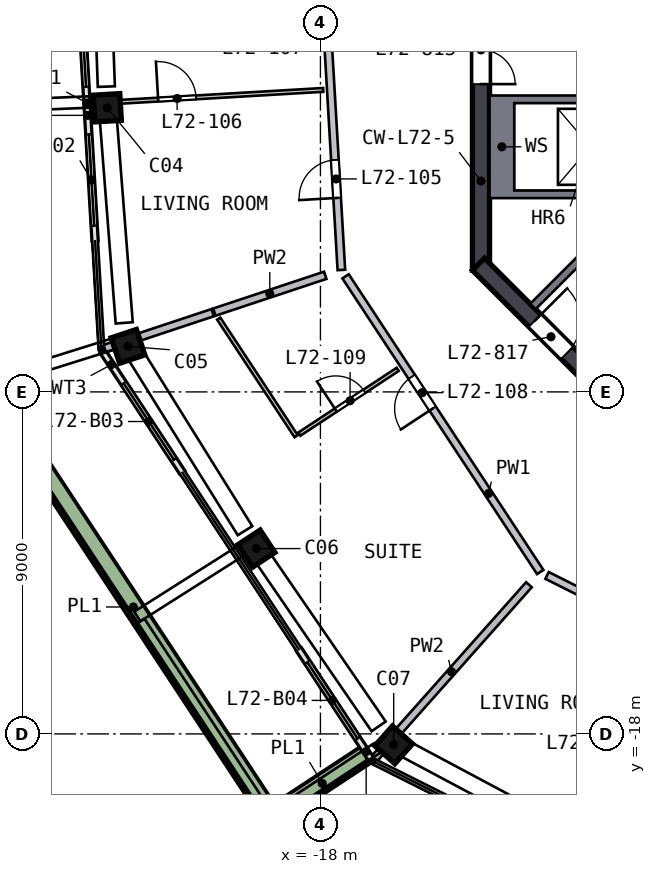
"""IFC4 building model, lengths in metres.
Left out: names, types, materials, properties, quantities, classifications, styles, units other than length and angle.
Written with IfcOpenShell. Run it as: python <this file> out.ifc"""

import sys

from ifc_helpers import new_model, si_unit, direction, frame, frame_2d, origin, origin_2d, place, context, subcontext, project, spatial, polyline, rectangle, outline, extrude, element, fill, save


model = new_model("IFC4")
c1 = context("Model", 3, precision=1e-05, world=origin(), true_north=direction((0.0, 1.0)))
c2 = subcontext(c1, "Body", "Model", "MODEL_VIEW")
j1 = project(units=[si_unit("LENGTHUNIT", "METRE"), si_unit("PLANEANGLEUNIT", "RADIAN")], contexts=[c1])
p1 = place(None, origin())
s1 = spatial("IfcSite", under=j1, at=p1, CompositionType="ELEMENT")
p2 = place(p1, origin())
s2 = spatial("IfcBuilding", under=s1, at=p2, CompositionType="ELEMENT")
p3 = place(p2, frame((0.0, 0.0, 291.5)))
s3 = spatial("IfcBuildingStorey", under=s2, at=p3, CompositionType="ELEMENT", Elevation=291.5)
p4 = place(p3, frame((-23.618, -1.387, 0.0), z_axis=(0.007528817, -0.112247814, 0.993651722), x_axis=(0.058082911, -0.991953134, -0.112496023)))
e1 = element("IfcColumn", 1, at=p4, inside=s3, PredefinedType="COLUMN", context=c2, shape_type="SweptSolid", body=[
    extrude(rectangle(XDim=0.7, YDim=0.7, at=origin_2d()), origin(), (0.0, 0.0, 1.0), 3.21),
])
p5 = place(p3, frame((-23.109, -7.669, 0.0), z_axis=(0.037401551, -0.109619993, 0.993269642), x_axis=(-0.312748183, 0.942748169, 0.11582083)))
e2 = element("IfcColumn", 2, at=p5, inside=s3, PredefinedType="COLUMN", context=c2, shape_type="SweptSolid", body=[
    extrude(rectangle(XDim=0.7, YDim=0.7, at=origin_2d()), origin(), (0.0, 0.0, 1.0), 3.212),
])
p6 = place(p3, frame((-19.76, -13.01, 0.0), z_axis=(0.062663903, -0.093463516, 0.993648734), x_axis=(0.546321949, -0.829982551, -0.112522412)))
e3 = element("IfcColumn", 3, at=p6, inside=s3, PredefinedType="COLUMN", context=c2, shape_type="SweptSolid", body=[
    extrude(rectangle(XDim=0.7, YDim=0.7, at=origin_2d()), origin(), (0.0, 0.0, 1.0), 3.21),
])
p7 = place(p3, frame((-16.178, -18.196, 0.0), z_axis=(0.087194218, -0.076247429, 0.993269096), x_axis=(-0.742135032, 0.660166681, 0.115825506)))
e4 = element("IfcColumn", 4, at=p7, inside=s3, PredefinedType="COLUMN", context=c2, shape_type="SweptSolid", body=[
    extrude(rectangle(XDim=0.7, YDim=0.7, at=origin_2d()), origin(), (0.0, 0.0, 1.0), 3.212),
])
p8 = place(p3, frame((-13.775, 5.799, 0.0), z_axis=(0.0, 0.0, 1.0), x_axis=(0.0, -1.0, 0.0)))
e5 = element("IfcWall", 5, at=p8, inside=s3, PredefinedType="SHEAR", context=c2, shape_type="SweptSolid", body=[
    extrude(rectangle(XDim=11.598, YDim=0.45, at=frame_2d((5.799, 0.0))), origin(), (0.0, 0.0, 1.0), 3.5),
])
p9 = place(p8, frame((4.899, 0.0, 0.0)))
e6 = element("IfcOpeningElement", 6, at=p9, cuts=e5, PredefinedType="OPENING", context=c2, shape_type="SweptSolid", body=[
    extrude(rectangle(XDim=1.8, YDim=2.1, at=frame_2d((0.9, 1.05))), frame((0.0, 0.235, 0.0), z_axis=(0.0, -1.0, 0.0), x_axis=(1.0, 0.0, 0.0)), (0.0, 0.0, 1.0), 0.47),
])
p10 = place(p3, frame((-13.841, -5.64, 0.0), z_axis=(0.0, 0.0, 1.0), x_axis=(0.707106781, -0.707106781, 0.0)))
e7 = element("IfcWall", 7, at=p10, inside=s3, PredefinedType="SHEAR", context=c2, shape_type="SweptSolid", body=[
    extrude(rectangle(XDim=11.598, YDim=0.45, at=frame_2d((5.799, 0.0))), origin(), (0.0, 0.0, 1.0), 3.5),
])
p11 = place(p10, frame((2.099, 0.0, 0.0)))
e8 = element("IfcOpeningElement", 8, at=p11, cuts=e7, PredefinedType="OPENING", context=c2, shape_type="SweptSolid", body=[
    extrude(rectangle(XDim=1.2, YDim=2.1, at=frame_2d((0.6, 1.05))), frame((0.0, 0.235, 0.0), z_axis=(0.0, -1.0, 0.0), x_axis=(1.0, 0.0, 0.0)), (0.0, 0.0, 1.0), 0.47),
])
p12 = place(p3, frame((-24.332, 1.827, 0.0), z_axis=(0.0, 0.0, 1.0), x_axis=(0.058589922, -0.998282135, 0.0)))
e9 = element("IfcWall", 9, at=p12, inside=s3, PredefinedType="SOLIDWALL", context=c2, shape_type="SweptSolid", body=[
    extrude(rectangle(XDim=3.25, YDim=0.15, at=frame_2d((1.625, 0.0))), origin(), (0.0, 0.0, 1.0), 2.525),
])
p13 = place(p12, frame((0.4, 0.0, 0.0)))
e10 = element("IfcOpeningElement", 10, at=p13, cuts=e9, PredefinedType="OPENING", context=c2, shape_type="SweptSolid", body=[
    extrude(rectangle(XDim=2.4, YDim=2.4, at=frame_2d((1.2, 1.2))), frame((0.0, 0.085, 0.0), z_axis=(0.0, -1.0, 0.0), x_axis=(1.0, 0.0, 0.0)), (0.0, 0.0, 1.0), 0.17),
])
p14 = place(p3, frame((-24.142, -1.417, 0.0), z_axis=(0.0, 0.0, 1.0), x_axis=(0.058615017, -0.998280662, 0.0)))
e11 = element("IfcWall", 11, at=p14, inside=s3, PredefinedType="SOLIDWALL", context=c2, shape_type="SweptSolid", body=[
    extrude(rectangle(XDim=3.611, YDim=0.15, at=frame_2d((1.806, 0.0))), origin(), (0.0, 0.0, 1.0), 2.525),
])
p15 = place(p14, frame((0.811, 0.0, 0.0)))
e12 = element("IfcOpeningElement", 12, at=p15, cuts=e11, PredefinedType="OPENING", context=c2, shape_type="SweptSolid", body=[
    extrude(rectangle(XDim=2.4, YDim=2.4, at=frame_2d((1.2, 1.2))), frame((0.0, 0.085, 0.0), z_axis=(0.0, -1.0, 0.0), x_axis=(1.0, 0.0, 0.0)), (0.0, 0.0, 1.0), 0.17),
])
p16 = place(p3, frame((-23.718, -7.953, 0.0), z_axis=(0.0, 0.0, 1.0), x_axis=(0.549914882, -0.835220703, 0.0)))
e13 = element("IfcWall", 13, at=p16, inside=s3, PredefinedType="SOLIDWALL", context=c2, shape_type="SweptSolid", body=[
    extrude(rectangle(XDim=3.787, YDim=0.15, at=frame_2d((1.893, 0.0))), origin(), (0.0, 0.0, 1.0), 2.525),
])
p17 = place(p16, frame((0.987, 0.0, 0.0)))
e14 = element("IfcOpeningElement", 14, at=p17, cuts=e13, PredefinedType="OPENING", context=c2, shape_type="SweptSolid", body=[
    extrude(rectangle(XDim=2.4, YDim=2.4, at=frame_2d((1.2, 1.2))), frame((0.0, 0.085, 0.0), z_axis=(0.0, -1.0, 0.0), x_axis=(1.0, 0.0, 0.0)), (0.0, 0.0, 1.0), 0.17),
])
p18 = place(p3, frame((-18.564, -15.781, 0.0), z_axis=(0.0, 0.0, 1.0), x_axis=(0.54985724, -0.835258652, 0.0)))
e15 = element("IfcWall", 15, at=p18, inside=s3, PredefinedType="SOLIDWALL", context=c2, shape_type="SweptSolid", body=[
    extrude(rectangle(XDim=3.427, YDim=0.15, at=frame_2d((1.713, 0.0))), origin(), (0.0, 0.0, 1.0), 2.525),
])
p19 = place(p18, frame((0.4, 0.0, 0.0)))
e16 = element("IfcOpeningElement", 16, at=p19, cuts=e15, PredefinedType="OPENING", context=c2, shape_type="SweptSolid", body=[
    extrude(rectangle(XDim=2.4, YDim=2.4, at=frame_2d((1.2, 1.2))), frame((0.0, 0.085, 0.0), z_axis=(0.0, -1.0, 0.0), x_axis=(1.0, 0.0, 0.0)), (0.0, 0.0, 1.0), 0.17),
])
p20 = place(p3, frame((-26.698, -8.928, 0.0), z_axis=(0.0, 0.0, 1.0), x_axis=(0.549900075, -0.835230452, 0.0)))
e17 = element("IfcWall", 17, at=p20, inside=s3, PredefinedType="SOLIDWALL", context=c2, shape_type="SweptSolid", body=[
    extrude(rectangle(XDim=13.724, YDim=0.5, at=frame_2d((6.862, 0.0))), origin(), (0.0, 0.0, 1.0), 0.7),
])
p21 = place(p3, frame((-19.08, -20.044, 0.0), z_axis=(0.0, 0.0, 1.0), x_axis=(0.835250913, 0.549868995, 0.0)))
e18 = element("IfcWall", 18, at=p21, inside=s3, PredefinedType="SOLIDWALL", context=c2, shape_type="SweptSolid", body=[
    extrude(rectangle(XDim=2.699, YDim=0.5, at=frame_2d((1.35, 0.0))), origin(), (0.0, 0.0, 1.0), 0.7),
])
p22 = place(p3, origin())
e19 = element("IfcWall", 19, at=p22, inside=s3, PredefinedType="SOLIDWALL", context=c2, shape_type="SweptSolid", body=[
    extrude(outline(polyline([(-13.55, -3.9), (-13.55, -1.2), (-9.9, -1.2), (-9.9, -1.4), (-12.9, -1.4), (-12.9, -3.7), (-9.9, -3.7), (-9.9, -3.9), (-13.55, -3.9)])), origin(), (0.0, 0.0, 1.0), 3.19),
])
p23 = place(p3, frame((-9.334, -3.677, 0.0), z_axis=(0.0, 0.0, 1.0), x_axis=(-0.707106781, -0.707106781, 0.0)))
e20 = element("IfcWall", 20, at=p23, inside=s3, PredefinedType="SOLIDWALL", context=c2, shape_type="SweptSolid", body=[
    extrude(rectangle(XDim=4.35, YDim=0.2, at=frame_2d((2.175, 0.0))), origin(), (0.0, 0.0, 1.0), 3.19),
])
p24 = place(p3, frame((-17.449, -5.791, 0.0), z_axis=(0.0, 0.0, 1.0), x_axis=(-0.058619102, 0.998280422, 0.0)))
e21 = element("IfcWall", 21, at=p24, inside=s3, PredefinedType="SOLIDWALL", context=c2, shape_type="SweptSolid", body=[
    extrude(rectangle(XDim=9.317, YDim=0.2, at=frame_2d((4.658, 0.0))), origin(), (0.0, 0.0, 1.0), 3.19),
])
p25 = place(p24, frame((1.9, 0.0, 0.0)))
e22 = element("IfcOpeningElement", 22, at=p25, cuts=e21, PredefinedType="OPENING", context=c2, shape_type="SweptSolid", body=[
    extrude(rectangle(XDim=1.0, YDim=2.1, at=frame_2d((0.5, 1.05))), frame((0.0, 0.11, 0.0), z_axis=(0.0, -1.0, 0.0), x_axis=(1.0, 0.0, 0.0)), (0.0, 0.0, 1.0), 0.22),
])
p26 = place(p3, frame((-12.216, -13.74, 0.0), z_axis=(0.0, 0.0, 1.0), x_axis=(-0.549889366, 0.835237502, 0.0)))
e23 = element("IfcWall", 23, at=p26, inside=s3, PredefinedType="SOLIDWALL", context=c2, shape_type="SweptSolid", body=[
    extrude(rectangle(XDim=9.316, YDim=0.2, at=frame_2d((4.658, 0.0))), origin(), (0.0, 0.0, 1.0), 3.19),
])
p27 = place(p26, frame((5.15, 0.0, 0.0)))
e24 = element("IfcOpeningElement", 24, at=p27, cuts=e23, PredefinedType="OPENING", context=c2, shape_type="SweptSolid", body=[
    extrude(rectangle(XDim=1.0, YDim=2.1, at=frame_2d((0.5, 1.05))), frame((0.0, 0.11, 0.0), z_axis=(0.0, -1.0, 0.0), x_axis=(1.0, 0.0, 0.0)), (0.0, 0.0, 1.0), 0.22),
])
p28 = place(p3, frame((-3.888, -17.917, 0.0), z_axis=(0.0, 0.0, 1.0), x_axis=(-0.893848004, 0.448370098, 0.0)))
e25 = element("IfcWall", 25, at=p28, inside=s3, PredefinedType="SOLIDWALL", context=c2, shape_type="SweptSolid", body=[
    extrude(rectangle(XDim=9.117, YDim=0.2, at=frame_2d((4.558, 0.0))), origin(), (0.0, 0.0, 1.0), 3.19),
])
p29 = place(p28, frame((6.458, 0.0, 0.0)))
e26 = element("IfcOpeningElement", 26, at=p29, cuts=e25, PredefinedType="OPENING", context=c2, shape_type="SweptSolid", body=[
    extrude(rectangle(XDim=1.0, YDim=2.1, at=frame_2d((0.5, 1.05))), frame((0.0, 0.11, 0.0), z_axis=(0.0, -1.0, 0.0), x_axis=(1.0, 0.0, 0.0)), (0.0, 0.0, 1.0), 0.22),
])
p30 = place(p3, frame((-20.835, -6.915, 0.0), z_axis=(0.0, 0.0, 1.0), x_axis=(-0.949104027, -0.31496277, 0.0)))
e27 = element("IfcWall", 27, at=p30, inside=s3, PredefinedType="SOLIDWALL", context=c2, shape_type="SweptSolid", body=[
    extrude(rectangle(XDim=3.011, YDim=0.2, at=frame_2d((1.506, 0.0))), origin(), (0.0, 0.0, 1.0), 3.19),
])
p31 = place(p3, frame((-17.873, -5.932, 0.0), z_axis=(0.0, 0.0, 1.0), x_axis=(-0.949095381, -0.314988821, 0.0)))
e28 = element("IfcWall", 28, at=p31, inside=s3, PredefinedType="SOLIDWALL", context=c2, shape_type="SweptSolid", body=[
    extrude(rectangle(XDim=3.075, YDim=0.2, at=frame_2d((1.537, 0.0))), origin(), (0.0, 0.0, 1.0), 3.19),
])
p32 = place(p3, frame((-12.513, -14.074, 0.0), z_axis=(0.0, 0.0, 1.0), x_axis=(-0.664445384, -0.747336826, 0.0)))
e29 = element("IfcWall", 29, at=p32, inside=s3, PredefinedType="SOLIDWALL", context=c2, shape_type="SweptSolid", body=[
    extrude(rectangle(XDim=6.132, YDim=0.2, at=frame_2d((3.066, 0.0))), origin(), (0.0, 0.0, 1.0), 3.19),
])
p33 = place(p3, frame((-24.067, -1.413, 0.0), z_axis=(0.0, 0.0, 1.0), x_axis=(0.998279571, 0.058633592, 0.0)))
e30 = element("IfcWall", 30, at=p33, inside=s3, PredefinedType="PARTITIONING", context=c2, shape_type="SweptSolid", body=[
    extrude(rectangle(XDim=6.15, YDim=0.1, at=frame_2d((3.075, 0.0))), origin(), (0.0, 0.0, 1.0), 3.19),
])
p34 = place(p33, frame((1.8, 0.0, 0.0)))
e31 = element("IfcOpeningElement", 31, at=p34, cuts=e30, PredefinedType="OPENING", context=c2, shape_type="SweptSolid", body=[
    extrude(rectangle(XDim=1.0, YDim=2.1, at=frame_2d((0.5, 1.05))), frame((0.0, 0.06, 0.0), z_axis=(0.0, -1.0, 0.0), x_axis=(1.0, 0.0, 0.0)), (0.0, 0.0, 1.0), 0.12),
])
p35 = place(p3, frame((-18.639, -10.166, 0.0), z_axis=(0.0, 0.0, 1.0), x_axis=(-0.54989974, 0.835230673, 0.0)))
e32 = element("IfcWall", 32, at=p35, inside=s3, PredefinedType="PARTITIONING", context=c2, shape_type="SweptSolid", body=[
    extrude(rectangle(XDim=3.704, YDim=0.1, at=frame_2d((1.852, 0.0))), origin(), (0.0, 0.0, 1.0), 3.19),
])
p36 = place(p3, frame((-18.555, -10.111, 0.0), z_axis=(0.0, 0.0, 1.0), x_axis=(0.835199098, 0.549947695, 0.0)))
e33 = element("IfcWall", 33, at=p36, inside=s3, PredefinedType="PARTITIONING", context=c2, shape_type="SweptSolid", body=[
    extrude(rectangle(XDim=3.1, YDim=0.1, at=frame_2d((1.55, 0.0))), origin(), (0.0, 0.0, 1.0), 3.19),
])
p37 = place(p36, frame((1.15, 0.0, 0.0)))
e34 = element("IfcOpeningElement", 34, at=p37, cuts=e33, PredefinedType="OPENING", context=c2, shape_type="SweptSolid", body=[
    extrude(rectangle(XDim=0.9, YDim=2.1, at=frame_2d((0.45, 1.05))), frame((0.0, 0.06, 0.0), z_axis=(0.0, -1.0, 0.0), x_axis=(1.0, 0.0, 0.0)), (0.0, 0.0, 1.0), 0.12),
])
p38 = place(p13, origin())
e35 = element("IfcDoor", 35, at=p38, inside=s3, OperationType="SLIDING_TO_RIGHT", PredefinedType="DOOR", context=c2, shape_type="SweptSolid", body=[
    extrude(rectangle(XDim=2.4, YDim=2.4, at=frame_2d((1.2, 1.2))), frame((0.0, 0.025, 0.0), z_axis=(0.0, -1.0, 0.0), x_axis=(1.0, 0.0, 0.0)), (0.0, 0.0, 1.0), 0.05),
])
fill(e10, e35)
p39 = place(p15, origin())
e36 = element("IfcDoor", 36, at=p39, inside=s3, OperationType="SLIDING_TO_LEFT", PredefinedType="DOOR", context=c2, shape_type="SweptSolid", body=[
    extrude(rectangle(XDim=2.4, YDim=2.4, at=frame_2d((1.2, 1.2))), frame((0.0, 0.025, 0.0), z_axis=(0.0, -1.0, 0.0), x_axis=(1.0, 0.0, 0.0)), (0.0, 0.0, 1.0), 0.05),
])
fill(e12, e36)
p40 = place(p17, origin())
e37 = element("IfcDoor", 37, at=p40, inside=s3, OperationType="SLIDING_TO_LEFT", PredefinedType="DOOR", context=c2, shape_type="SweptSolid", body=[
    extrude(rectangle(XDim=2.4, YDim=2.4, at=frame_2d((1.2, 1.2))), frame((0.0, 0.025, 0.0), z_axis=(0.0, -1.0, 0.0), x_axis=(1.0, 0.0, 0.0)), (0.0, 0.0, 1.0), 0.05),
])
fill(e14, e37)
p41 = place(p19, origin())
e38 = element("IfcDoor", 38, at=p41, inside=s3, OperationType="SLIDING_TO_RIGHT", PredefinedType="DOOR", context=c2, shape_type="SweptSolid", body=[
    extrude(rectangle(XDim=2.4, YDim=2.4, at=frame_2d((1.2, 1.2))), frame((0.0, 0.025, 0.0), z_axis=(0.0, -1.0, 0.0), x_axis=(1.0, 0.0, 0.0)), (0.0, 0.0, 1.0), 0.05),
])
fill(e16, e38)
p42 = place(p9, origin())
e39 = element("IfcDoor", 39, at=p42, inside=s3, OperationType="DOUBLE_DOOR_SINGLE_SWING", PredefinedType="DOOR", context=c2, shape_type="SweptSolid", body=[
    extrude(rectangle(XDim=1.8, YDim=2.1, at=frame_2d((0.9, 1.05))), frame((0.0, 0.025, 0.0), z_axis=(0.0, -1.0, 0.0), x_axis=(1.0, 0.0, 0.0)), (0.0, 0.0, 1.0), 0.05),
])
fill(e6, e39)
p43 = place(p11, origin())
e40 = element("IfcDoor", 40, at=p43, inside=s3, OperationType="SINGLE_SWING_LEFT", PredefinedType="DOOR", context=c2, shape_type="SweptSolid", body=[
    extrude(rectangle(XDim=1.2, YDim=2.1, at=frame_2d((0.6, 1.05))), frame((0.0, 0.025, 0.0), z_axis=(0.0, -1.0, 0.0), x_axis=(1.0, 0.0, 0.0)), (0.0, 0.0, 1.0), 0.05),
])
fill(e8, e40)
p44 = place(p25, origin())
e41 = element("IfcDoor", 41, at=p44, inside=s3, OperationType="SINGLE_SWING_LEFT", PredefinedType="DOOR", context=c2, shape_type="SweptSolid", body=[
    extrude(rectangle(XDim=1.0, YDim=2.1, at=frame_2d((0.5, 1.05))), frame((0.0, 0.025, 0.0), z_axis=(0.0, -1.0, 0.0), x_axis=(1.0, 0.0, 0.0)), (0.0, 0.0, 1.0), 0.05),
])
fill(e22, e41)
p45 = place(p34, origin())
e42 = element("IfcDoor", 42, at=p45, inside=s3, OperationType="SINGLE_SWING_LEFT", PredefinedType="DOOR", context=c2, shape_type="SweptSolid", body=[
    extrude(rectangle(XDim=1.0, YDim=2.1, at=frame_2d((0.5, 1.05))), frame((0.0, 0.025, 0.0), z_axis=(0.0, -1.0, 0.0), x_axis=(1.0, 0.0, 0.0)), (0.0, 0.0, 1.0), 0.05),
])
fill(e31, e42)
p46 = place(p27, origin())
e43 = element("IfcDoor", 43, at=p46, inside=s3, OperationType="SINGLE_SWING_LEFT", PredefinedType="DOOR", context=c2, shape_type="SweptSolid", body=[
    extrude(rectangle(XDim=1.0, YDim=2.1, at=frame_2d((0.5, 1.05))), frame((0.0, 0.025, 0.0), z_axis=(0.0, -1.0, 0.0), x_axis=(1.0, 0.0, 0.0)), (0.0, 0.0, 1.0), 0.05),
])
fill(e24, e43)
p47 = place(p37, origin())
e44 = element("IfcDoor", 44, at=p47, inside=s3, OperationType="SINGLE_SWING_LEFT", PredefinedType="DOOR", context=c2, shape_type="SweptSolid", body=[
    extrude(rectangle(XDim=0.9, YDim=2.1, at=frame_2d((0.45, 1.05))), frame((0.0, 0.025, 0.0), z_axis=(0.0, -1.0, 0.0), x_axis=(1.0, 0.0, 0.0)), (0.0, 0.0, 1.0), 0.05),
])
fill(e34, e44)
save(model, sys.argv[1])
